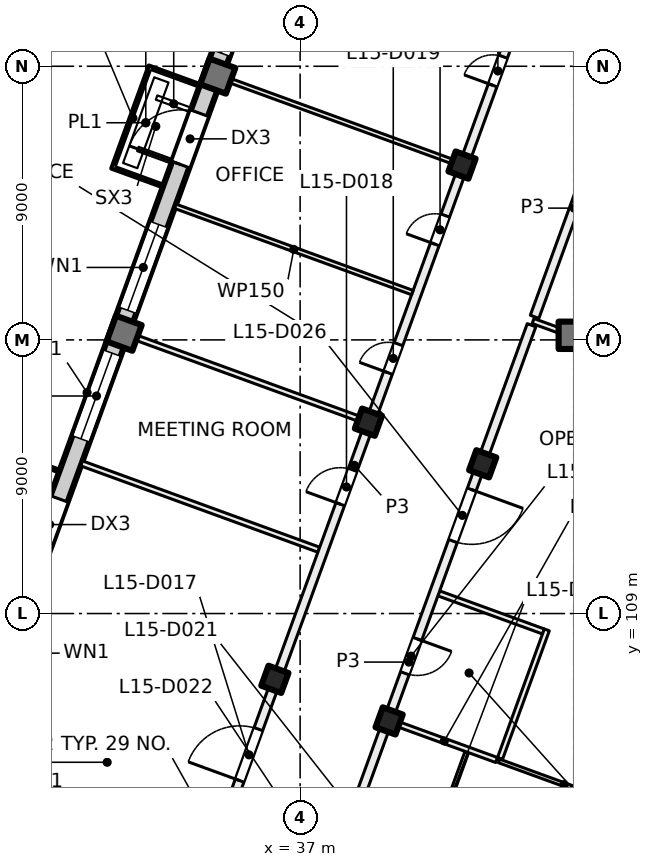
"""IFC4 building model, lengths in metres.
Left out: names, types, materials, properties, quantities, classifications, styles, units other than length and angle.
Written with IfcOpenShell. Run it as: python <this file> out.ifc"""

import sys

from ifc_helpers import new_model, si_unit, direction, frame, frame_2d, origin, origin_2d, place, context, subcontext, project, spatial, rectangle, extrude, element, fill, save


model = new_model("IFC4")
c1 = context("Model", 3, precision=1e-05, world=origin(), true_north=direction((0.0, 1.0)))
c2 = subcontext(c1, "Body", "Model", "MODEL_VIEW")
j1 = project(units=[si_unit("LENGTHUNIT", "METRE"), si_unit("PLANEANGLEUNIT", "RADIAN")], contexts=[c1])
p1 = place(None, origin())
s1 = spatial("IfcSite", under=j1, at=p1, CompositionType="ELEMENT")
p2 = place(p1, origin())
s2 = spatial("IfcBuilding", under=s1, at=p2, CompositionType="ELEMENT")
p3 = place(p2, frame((0.0, 0.0, 67.5)))
s3 = spatial("IfcBuildingStorey", under=s2, at=p3, CompositionType="ELEMENT", Elevation=67.5)
p4 = place(p3, frame((45.952, 118.152, 0.0), z_axis=(0.0, 0.0, 1.0), x_axis=(1.0, 0.0, 0.0)))
e1 = element("IfcColumn", 1, at=p4, inside=s3, PredefinedType="COLUMN", context=c2, shape_type="SweptSolid", body=[
    extrude(rectangle(XDim=0.9, YDim=0.9, at=origin_2d()), origin(), (0.0, 0.0, 1.0), 4.0),
])
for number, where, z_axis, x_axis in (
    (2, (43.006, 113.925, 0.0), (0.0, 0.0, 1.0), (-0.342, -0.94, 0.0)),
    (3, (39.927, 105.468, 0.0), (0.0, 0.0, 1.0), (-0.342, -0.94, 0.0)),
    (4, (42.325, 123.751, 0.0), (0.0, 0.0, 1.0), (-0.342, -0.94, 0.0)),
    (5, (39.247, 115.293, 0.0), (0.0, 0.0, 1.0), (-0.342, -0.94, 0.0)),
    (6, (36.169, 106.836, 0.0), (0.0, 0.0, 1.0), (-0.342, -0.94, 0.0)),
):
    element("IfcColumn", number, at=place(p3, frame(where, z_axis=z_axis, x_axis=x_axis)), inside=s3, PredefinedType="COLUMN", context=c2, shape_type="SweptSolid", body=[
        extrude(rectangle(XDim=0.7, YDim=0.7, at=origin_2d()), origin(), (0.0, 0.0, 1.0), 4.0),
    ])
for number, where, z_axis, x_axis in (
    (7, (34.291, 126.675, 0.0), (0.0, 0.0, 1.0), (-0.342, -0.94, 0.0)),
    (8, (31.212, 118.218, 0.0), (0.0, 0.0, 1.0), (-0.342, -0.94, 0.0)),
):
    element("IfcColumn", number, at=place(p3, frame(where, z_axis=z_axis, x_axis=x_axis)), inside=s3, PredefinedType="COLUMN", context=c2, shape_type="SweptSolid", body=[
        extrude(rectangle(XDim=0.9, YDim=0.9, at=origin_2d()), origin(), (0.0, 0.0, 1.0), 4.0),
    ])
p5 = place(p3, frame((52.212, 113.783, 0.0), z_axis=(0.0, 0.0, 1.0), x_axis=(-0.34202521188, -0.939690775968, 0.0)))
e9 = element("IfcWall", 9, at=p5, inside=s3, PredefinedType="SOLIDWALL", context=c2, shape_type="SweptSolid", body=[
    extrude(rectangle(XDim=21.745, YDim=0.6, at=frame_2d((10.873, 0.0))), origin(), (0.0, 0.0, 1.0), 3.625),
])
p6 = place(p5, frame((3.765, 0.0, 0.9)))
e10 = element("IfcOpeningElement", 10, at=p6, cuts=e9, PredefinedType="OPENING", context=c2, shape_type="SweptSolid", body=[
    extrude(rectangle(XDim=3.0, YDim=2.4, at=frame_2d((1.5, 1.2))), frame((0.0, 0.31, 0.0), z_axis=(0.0, -1.0, 0.0), x_axis=(1.0, 0.0, 0.0)), (0.0, 0.0, 1.0), 0.62),
])
p7 = place(p5, frame((8.865, 0.0, 0.0)))
e11 = element("IfcOpeningElement", 11, at=p7, cuts=e9, PredefinedType="OPENING", context=c2, shape_type="SweptSolid", body=[
    extrude(rectangle(XDim=1.8, YDim=2.4, at=frame_2d((0.9, 1.2))), frame((0.0, 0.31, 0.0), z_axis=(0.0, -1.0, 0.0), x_axis=(1.0, 0.0, 0.0)), (0.0, 0.0, 1.0), 0.62),
])
p8 = place(p5, frame((12.765, 0.0, 0.9)))
e12 = element("IfcOpeningElement", 12, at=p8, cuts=e9, PredefinedType="OPENING", context=c2, shape_type="SweptSolid", body=[
    extrude(rectangle(XDim=3.0, YDim=2.4, at=frame_2d((1.5, 1.2))), frame((0.0, 0.31, 0.0), z_axis=(0.0, -1.0, 0.0), x_axis=(1.0, 0.0, 0.0)), (0.0, 0.0, 1.0), 0.62),
])
p9 = place(p5, frame((17.265, 0.0, 0.9)))
e13 = element("IfcOpeningElement", 13, at=p9, cuts=e9, PredefinedType="OPENING", context=c2, shape_type="SweptSolid", body=[
    extrude(rectangle(XDim=3.0, YDim=2.4, at=frame_2d((1.5, 1.2))), frame((0.0, 0.31, 0.0), z_axis=(0.0, -1.0, 0.0), x_axis=(1.0, 0.0, 0.0)), (0.0, 0.0, 1.0), 0.62),
])
p10 = place(p3, frame((24.666, 100.669, 0.0), z_axis=(0.0, 0.0, 1.0), x_axis=(0.34201964167, 0.939692803373, 0.0)))
e14 = element("IfcWall", 14, at=p10, inside=s3, PredefinedType="SOLIDWALL", context=c2, shape_type="SweptSolid", body=[
    extrude(rectangle(XDim=32.884, YDim=0.6, at=frame_2d((16.442, 0.0))), origin(), (0.0, 0.0, 1.0), 3.625),
])
p11 = place(p10, frame((1.48, 0.0, 0.9)))
e15 = element("IfcOpeningElement", 15, at=p11, cuts=e14, PredefinedType="OPENING", context=c2, shape_type="SweptSolid", body=[
    extrude(rectangle(XDim=3.0, YDim=2.4, at=frame_2d((1.5, 1.2))), frame((0.0, 0.31, 0.0), z_axis=(0.0, -1.0, 0.0), x_axis=(1.0, 0.0, 0.0)), (0.0, 0.0, 1.0), 0.62),
])
p12 = place(p10, frame((5.98, 0.0, 0.9)))
e16 = element("IfcOpeningElement", 16, at=p12, cuts=e14, PredefinedType="OPENING", context=c2, shape_type="SweptSolid", body=[
    extrude(rectangle(XDim=3.0, YDim=2.4, at=frame_2d((1.5, 1.2))), frame((0.0, 0.31, 0.0), z_axis=(0.0, -1.0, 0.0), x_axis=(1.0, 0.0, 0.0)), (0.0, 0.0, 1.0), 0.62),
])
p13 = place(p10, frame((11.08, 0.0, 0.0)))
e17 = element("IfcOpeningElement", 17, at=p13, cuts=e14, PredefinedType="OPENING", context=c2, shape_type="SweptSolid", body=[
    extrude(rectangle(XDim=1.8, YDim=2.4, at=frame_2d((0.9, 1.2))), frame((0.0, 0.31, 0.0), z_axis=(0.0, -1.0, 0.0), x_axis=(1.0, 0.0, 0.0)), (0.0, 0.0, 1.0), 0.62),
])
p14 = place(p10, frame((14.98, 0.0, 0.9)))
e18 = element("IfcOpeningElement", 18, at=p14, cuts=e14, PredefinedType="OPENING", context=c2, shape_type="SweptSolid", body=[
    extrude(rectangle(XDim=3.0, YDim=2.4, at=frame_2d((1.5, 1.2))), frame((0.0, 0.31, 0.0), z_axis=(0.0, -1.0, 0.0), x_axis=(1.0, 0.0, 0.0)), (0.0, 0.0, 1.0), 0.62),
])
p15 = place(p10, frame((19.48, 0.0, 0.9)))
e19 = element("IfcOpeningElement", 19, at=p15, cuts=e14, PredefinedType="OPENING", context=c2, shape_type="SweptSolid", body=[
    extrude(rectangle(XDim=3.0, YDim=2.4, at=frame_2d((1.5, 1.2))), frame((0.0, 0.31, 0.0), z_axis=(0.0, -1.0, 0.0), x_axis=(1.0, 0.0, 0.0)), (0.0, 0.0, 1.0), 0.62),
])
p16 = place(p10, frame((24.58, 0.0, 0.0)))
e20 = element("IfcOpeningElement", 20, at=p16, cuts=e14, PredefinedType="OPENING", context=c2, shape_type="SweptSolid", body=[
    extrude(rectangle(XDim=1.8, YDim=2.4, at=frame_2d((0.9, 1.2))), frame((0.0, 0.31, 0.0), z_axis=(0.0, -1.0, 0.0), x_axis=(1.0, 0.0, 0.0)), (0.0, 0.0, 1.0), 0.62),
])
p17 = place(p10, frame((28.48, 0.0, 0.9)))
e21 = element("IfcOpeningElement", 21, at=p17, cuts=e14, PredefinedType="OPENING", context=c2, shape_type="SweptSolid", body=[
    extrude(rectangle(XDim=3.0, YDim=2.4, at=frame_2d((1.5, 1.2))), frame((0.0, 0.31, 0.0), z_axis=(0.0, -1.0, 0.0), x_axis=(1.0, 0.0, 0.0)), (0.0, 0.0, 1.0), 0.62),
])
p18 = place(p3, frame((29.814, 113.938, 0.0), z_axis=(0.0, 0.0, 1.0), x_axis=(0.939697205528, -0.342007546586, 0.0)))
e22 = element("IfcWall", 22, at=p18, inside=s3, PredefinedType="PARTITIONING", context=c2, shape_type="SweptSolid", body=[
    extrude(rectangle(XDim=8.301, YDim=0.175, at=frame_2d((4.15, 0.0))), origin(), (0.0, 0.0, 1.0), 3.625),
])
p19 = place(p3, frame((31.353, 118.166, 0.0), z_axis=(0.0, 0.0, 1.0), x_axis=(0.939687752599, -0.342033518263, 0.0)))
e23 = element("IfcWall", 23, at=p19, inside=s3, PredefinedType="PARTITIONING", context=c2, shape_type="SweptSolid", body=[
    extrude(rectangle(XDim=8.301, YDim=0.175, at=frame_2d((4.15, 0.0))), origin(), (0.0, 0.0, 1.0), 3.625),
])
p20 = place(p3, frame((32.881, 97.657, 0.0), z_axis=(0.0, 0.0, 1.0), x_axis=(0.342017360004, 0.939693633828, 0.0)))
e24 = element("IfcWall", 24, at=p20, inside=s3, PredefinedType="PARTITIONING", context=c2, shape_type="SweptSolid", body=[
    extrude(rectangle(XDim=34.516, YDim=0.3, at=frame_2d((17.258, 0.0))), origin(), (0.0, 0.0, 1.0), 3.625),
])
p21 = place(p20, frame((6.225, 0.0, 0.0)))
e25 = element("IfcOpeningElement", 25, at=p21, cuts=e24, PredefinedType="OPENING", context=c2, shape_type="SweptSolid", body=[
    extrude(rectangle(XDim=1.8, YDim=2.1, at=frame_2d((0.9, 1.05))), frame((0.0, 0.16, 0.0), z_axis=(0.0, -1.0, 0.0), x_axis=(1.0, 0.0, 0.0)), (0.0, 0.0, 1.0), 0.32),
])
p22 = place(p20, frame((15.9, 0.0, 0.0)))
e26 = element("IfcOpeningElement", 26, at=p22, cuts=e24, PredefinedType="OPENING", context=c2, shape_type="SweptSolid", body=[
    extrude(rectangle(XDim=1.2, YDim=2.1, at=frame_2d((0.6, 1.05))), frame((0.0, 0.16, 0.0), z_axis=(0.0, -1.0, 0.0), x_axis=(1.0, 0.0, 0.0)), (0.0, 0.0, 1.0), 0.32),
])
p23 = place(p20, frame((20.5, 0.0, 0.0)))
e27 = element("IfcOpeningElement", 27, at=p23, cuts=e24, PredefinedType="OPENING", context=c2, shape_type="SweptSolid", body=[
    extrude(rectangle(XDim=1.0, YDim=2.1, at=frame_2d((0.5, 1.05))), frame((0.0, 0.16, 0.0), z_axis=(0.0, -1.0, 0.0), x_axis=(1.0, 0.0, 0.0)), (0.0, 0.0, 1.0), 0.32),
])
p24 = place(p20, frame((25.0, 0.0, 0.0)))
e28 = element("IfcOpeningElement", 28, at=p24, cuts=e24, PredefinedType="OPENING", context=c2, shape_type="SweptSolid", body=[
    extrude(rectangle(XDim=1.0, YDim=2.1, at=frame_2d((0.5, 1.05))), frame((0.0, 0.16, 0.0), z_axis=(0.0, -1.0, 0.0), x_axis=(1.0, 0.0, 0.0)), (0.0, 0.0, 1.0), 0.32),
])
p25 = place(p20, frame((30.562, 0.0, 0.0)))
e29 = element("IfcOpeningElement", 29, at=p25, cuts=e24, PredefinedType="OPENING", context=c2, shape_type="SweptSolid", body=[
    extrude(rectangle(XDim=1.0, YDim=2.1, at=frame_2d((0.5, 1.05))), frame((0.0, 0.16, 0.0), z_axis=(0.0, -1.0, 0.0), x_axis=(1.0, 0.0, 0.0)), (0.0, 0.0, 1.0), 0.32),
])
p26 = place(p3, frame((32.892, 122.395, 0.0), z_axis=(0.0, 0.0, 1.0), x_axis=(0.939684311623, -0.3420429717, 0.0)))
e30 = element("IfcWall", 30, at=p26, inside=s3, PredefinedType="PARTITIONING", context=c2, shape_type="SweptSolid", body=[
    extrude(rectangle(XDim=8.301, YDim=0.15, at=frame_2d((4.15, 0.0))), origin(), (0.0, 0.0, 1.0), 3.625),
])
p27 = place(p3, frame((42.482, 104.446, 0.0), z_axis=(0.0, 0.0, 1.0), x_axis=(-0.342025030348, -0.939690842041, 0.0)))
e31 = element("IfcWall", 31, at=p27, inside=s3, PredefinedType="PARTITIONING", context=c2, shape_type="SweptSolid", body=[
    extrude(rectangle(XDim=9.663, YDim=0.125, at=frame_2d((4.832, 0.0))), origin(), (0.0, 0.0, 1.0), 3.625),
])
p28 = place(p27, frame((1.797, 0.0, 0.0)))
e32 = element("IfcOpeningElement", 32, at=p28, cuts=e31, PredefinedType="OPENING", context=c2, shape_type="SweptSolid", body=[
    extrude(rectangle(XDim=0.8, YDim=2.1, at=frame_2d((0.4, 1.05))), frame((0.0, 0.073, 0.0), z_axis=(0.0, -1.0, 0.0), x_axis=(1.0, 0.0, 0.0)), (0.0, 0.0, 1.0), 0.145),
])
p29 = place(p27, frame((5.015, 0.0, 0.0)))
e33 = element("IfcOpeningElement", 33, at=p29, cuts=e31, PredefinedType="OPENING", context=c2, shape_type="SweptSolid", body=[
    extrude(rectangle(XDim=0.8, YDim=2.1, at=frame_2d((0.4, 1.05))), frame((0.0, 0.073, 0.0), z_axis=(0.0, -1.0, 0.0), x_axis=(1.0, 0.0, 0.0)), (0.0, 0.0, 1.0), 0.145),
])
p30 = place(p3, frame((40.021, 105.434, 0.0), z_axis=(0.0, 0.0, 1.0), x_axis=(0.939740864669, -0.341887565249, 0.0)))
e34 = element("IfcWall", 34, at=p30, inside=s3, PredefinedType="PARTITIONING", context=c2, shape_type="SweptSolid", body=[
    extrude(rectangle(XDim=3.663, YDim=0.175, at=frame_2d((1.831, 0.0))), origin(), (0.0, 0.0, 1.0), 3.625),
])
p31 = place(p3, frame((41.561, 109.663, 0.0), z_axis=(0.0, 0.0, 1.0), x_axis=(0.939623960717, -0.342208726434, 0.0)))
e35 = element("IfcWall", 35, at=p31, inside=s3, PredefinedType="PARTITIONING", context=c2, shape_type="SweptSolid", body=[
    extrude(rectangle(XDim=3.662, YDim=0.175, at=frame_2d((1.831, 0.0))), origin(), (0.0, 0.0, 1.0), 3.625),
])
p32 = place(p3, frame((42.231, 123.785, 0.0), z_axis=(0.0, 0.0, 1.0), x_axis=(-0.939687752599, 0.342033518263, 0.0)))
e36 = element("IfcWall", 36, at=p32, inside=s3, PredefinedType="PARTITIONING", context=c2, shape_type="SweptSolid", body=[
    extrude(rectangle(XDim=8.301, YDim=0.15, at=frame_2d((4.15, 0.0))), origin(), (0.0, 0.0, 1.0), 3.625),
])
p33 = place(p3, frame((43.542, 104.153, 0.0), z_axis=(0.0, 0.0, 1.0), x_axis=(0.939646198652, -0.34214766017, 0.0)))
e37 = element("IfcWall", 37, at=p33, inside=s3, PredefinedType="PARTITIONING", context=c2, shape_type="SweptSolid", body=[
    extrude(rectangle(XDim=4.554, YDim=0.125, at=frame_2d((2.277, 0.0))), origin(), (0.0, 0.0, 1.0), 3.625),
])
p34 = place(p3, frame((52.965, 115.598, 0.0), z_axis=(0.0, 0.0, 1.0), x_axis=(-0.939650555598, 0.342135694374, 0.0)))
e38 = element("IfcWall", 38, at=p34, inside=s3, PredefinedType="PARTITIONING", context=c2, shape_type="SweptSolid", body=[
    extrude(rectangle(XDim=8.836, YDim=0.175, at=frame_2d((4.418, 0.0))), origin(), (0.0, 0.0, 1.0), 3.625),
])
p35 = place(p34, frame((3.818, 0.0, 0.0)))
e39 = element("IfcOpeningElement", 39, at=p35, cuts=e38, PredefinedType="OPENING", context=c2, shape_type="SweptSolid", body=[
    extrude(rectangle(XDim=1.2, YDim=2.1, at=frame_2d((0.6, 1.05))), frame((0.0, 0.097, 0.0), z_axis=(0.0, -1.0, 0.0), x_axis=(1.0, 0.0, 0.0)), (0.0, 0.0, 1.0), 0.195),
])
p36 = place(p3, frame((44.612, 118.483, 0.0), z_axis=(0.0, 0.0, 1.0), x_axis=(-0.342043123066, -0.939684256526, 0.0)))
e40 = element("IfcWall", 40, at=p36, inside=s3, PredefinedType="PARTITIONING", context=c2, shape_type="SweptSolid", body=[
    extrude(rectangle(XDim=23.582, YDim=0.3, at=frame_2d((11.791, 0.0))), origin(), (0.0, 0.0, 1.0), 3.625),
])
p37 = place(p36, frame((16.583, 0.0, 0.0)))
e41 = element("IfcOpeningElement", 41, at=p37, cuts=e40, PredefinedType="OPENING", context=c2, shape_type="SweptSolid", body=[
    extrude(rectangle(XDim=1.0, YDim=2.1, at=frame_2d((0.5, 1.05))), frame((0.0, 0.16, 0.0), z_axis=(0.0, -1.0, 0.0), x_axis=(1.0, 0.0, 0.0)), (0.0, 0.0, 1.0), 0.32),
])
p38 = place(p36, frame((10.982, 0.0, 0.0)))
e42 = element("IfcOpeningElement", 42, at=p38, cuts=e40, PredefinedType="OPENING", context=c2, shape_type="SweptSolid", body=[
    extrude(rectangle(XDim=1.2, YDim=2.1, at=frame_2d((0.6, 1.05))), frame((0.0, 0.16, 0.0), z_axis=(0.0, -1.0, 0.0), x_axis=(1.0, 0.0, 0.0)), (0.0, 0.0, 1.0), 0.32),
])
p39 = place(p36, frame((5.756, 0.0, 0.0)))
e43 = element("IfcOpeningElement", 43, at=p39, cuts=e40, PredefinedType="OPENING", context=c2, shape_type="SweptSolid", body=[
    extrude(rectangle(XDim=1.8, YDim=2.1, at=frame_2d((0.9, 1.05))), frame((0.0, 0.16, 0.0), z_axis=(0.0, -1.0, 0.0), x_axis=(1.0, 0.0, 0.0)), (0.0, 0.0, 1.0), 0.32),
])
p40 = place(p3, frame((45.114, 108.462, 0.0), z_axis=(0.0, 0.0, 1.0), x_axis=(-0.342056723843, -0.93967930576, 0.0)))
e44 = element("IfcWall", 44, at=p40, inside=s3, PredefinedType="PARTITIONING", context=c2, shape_type="SweptSolid", body=[
    extrude(rectangle(XDim=4.5, YDim=0.175, at=frame_2d((2.25, 0.0))), origin(), (0.0, 0.0, 1.0), 3.625),
])
p41 = place(p3, frame((47.314, 125.909, 0.0), z_axis=(0.0, 0.0, 1.0), x_axis=(-0.34198522802, -0.939705328183, 0.0)))
e45 = element("IfcWall", 45, at=p41, inside=s3, PredefinedType="PARTITIONING", context=c2, shape_type="SweptSolid", body=[
    extrude(rectangle(XDim=7.609, YDim=0.3, at=frame_2d((3.804, 0.0))), origin(), (0.0, 0.0, 1.0), 3.625),
])
p42 = place(p13, origin())
e46 = element("IfcDoor", 46, at=p42, inside=s3, OperationType="DOUBLE_DOOR_SINGLE_SWING", PredefinedType="DOOR", context=c2, shape_type="SweptSolid", body=[
    extrude(rectangle(XDim=1.8, YDim=2.4, at=frame_2d((0.9, 1.2))), frame((0.0, 0.025, 0.0), z_axis=(0.0, -1.0, 0.0), x_axis=(1.0, 0.0, 0.0)), (0.0, 0.0, 1.0), 0.05),
])
fill(e17, e46)
p43 = place(p14, origin())
e47 = element("IfcWindow", 47, at=p43, inside=s3, PartitioningType="SINGLE_PANEL", PredefinedType="WINDOW", context=c2, shape_type="SweptSolid", body=[
    extrude(rectangle(XDim=3.0, YDim=2.4, at=frame_2d((1.5, 1.2))), frame((0.0, 0.03, 0.0), z_axis=(0.0, -1.0, 0.0), x_axis=(1.0, 0.0, 0.0)), (0.0, 0.0, 1.0), 0.06),
])
fill(e18, e47)
p44 = place(p15, origin())
e48 = element("IfcWindow", 48, at=p44, inside=s3, PartitioningType="SINGLE_PANEL", PredefinedType="WINDOW", context=c2, shape_type="SweptSolid", body=[
    extrude(rectangle(XDim=3.0, YDim=2.4, at=frame_2d((1.5, 1.2))), frame((0.0, 0.03, 0.0), z_axis=(0.0, -1.0, 0.0), x_axis=(1.0, 0.0, 0.0)), (0.0, 0.0, 1.0), 0.06),
])
fill(e19, e48)
p45 = place(p16, origin())
e49 = element("IfcDoor", 49, at=p45, inside=s3, OperationType="DOUBLE_DOOR_SINGLE_SWING", PredefinedType="DOOR", context=c2, shape_type="SweptSolid", body=[
    extrude(rectangle(XDim=1.8, YDim=2.4, at=frame_2d((0.9, 1.2))), frame((0.0, 0.025, 0.0), z_axis=(0.0, -1.0, 0.0), x_axis=(1.0, 0.0, 0.0)), (0.0, 0.0, 1.0), 0.05),
])
fill(e20, e49)
p46 = place(p17, origin())
e50 = element("IfcWindow", 50, at=p46, inside=s3, PartitioningType="SINGLE_PANEL", PredefinedType="WINDOW", context=c2, shape_type="SweptSolid", body=[
    extrude(rectangle(XDim=3.0, YDim=2.4, at=frame_2d((1.5, 1.2))), frame((0.0, 0.03, 0.0), z_axis=(0.0, -1.0, 0.0), x_axis=(1.0, 0.0, 0.0)), (0.0, 0.0, 1.0), 0.06),
])
fill(e21, e50)
p47 = place(p21, origin())
e51 = element("IfcDoor", 51, at=p47, inside=s3, OperationType="DOUBLE_DOOR_SINGLE_SWING", PredefinedType="DOOR", context=c2, shape_type="SweptSolid", body=[
    extrude(rectangle(XDim=1.8, YDim=2.1, at=frame_2d((0.9, 1.05))), frame((0.0, 0.025, 0.0), z_axis=(0.0, -1.0, 0.0), x_axis=(1.0, 0.0, 0.0)), (0.0, 0.0, 1.0), 0.05),
])
fill(e25, e51)
p48 = place(p22, origin())
e52 = element("IfcDoor", 52, at=p48, inside=s3, OperationType="DOUBLE_DOOR_SINGLE_SWING", PredefinedType="DOOR", context=c2, shape_type="SweptSolid", body=[
    extrude(rectangle(XDim=1.2, YDim=2.1, at=frame_2d((0.6, 1.05))), frame((0.0, 0.025, 0.0), z_axis=(0.0, -1.0, 0.0), x_axis=(1.0, 0.0, 0.0)), (0.0, 0.0, 1.0), 0.05),
])
fill(e26, e52)
p49 = place(p23, origin())
e53 = element("IfcDoor", 53, at=p49, inside=s3, OperationType="SINGLE_SWING_LEFT", PredefinedType="DOOR", context=c2, shape_type="SweptSolid", body=[
    extrude(rectangle(XDim=1.0, YDim=2.1, at=frame_2d((0.5, 1.05))), frame((0.0, 0.025, 0.0), z_axis=(0.0, -1.0, 0.0), x_axis=(1.0, 0.0, 0.0)), (0.0, 0.0, 1.0), 0.05),
])
fill(e27, e53)
p50 = place(p24, origin())
e54 = element("IfcDoor", 54, at=p50, inside=s3, OperationType="SINGLE_SWING_RIGHT", PredefinedType="DOOR", context=c2, shape_type="SweptSolid", body=[
    extrude(rectangle(XDim=1.0, YDim=2.1, at=frame_2d((0.5, 1.05))), frame((0.0, 0.025, 0.0), z_axis=(0.0, -1.0, 0.0), x_axis=(1.0, 0.0, 0.0)), (0.0, 0.0, 1.0), 0.05),
])
fill(e28, e54)
p51 = place(p38, origin())
e55 = element("IfcDoor", 55, at=p51, inside=s3, OperationType="DOUBLE_DOOR_SINGLE_SWING", PredefinedType="DOOR", context=c2, shape_type="SweptSolid", body=[
    extrude(rectangle(XDim=1.2, YDim=2.1, at=frame_2d((0.6, 1.05))), frame((0.0, 0.025, 0.0), z_axis=(0.0, -1.0, 0.0), x_axis=(1.0, 0.0, 0.0)), (0.0, 0.0, 1.0), 0.05),
])
fill(e42, e55)
p52 = place(p39, origin())
e56 = element("IfcDoor", 56, at=p52, inside=s3, OperationType="DOUBLE_DOOR_SINGLE_SWING", PredefinedType="DOOR", context=c2, shape_type="SweptSolid", body=[
    extrude(rectangle(XDim=1.8, YDim=2.1, at=frame_2d((0.9, 1.05))), frame((0.0, 0.025, 0.0), z_axis=(0.0, -1.0, 0.0), x_axis=(1.0, 0.0, 0.0)), (0.0, 0.0, 1.0), 0.05),
])
fill(e43, e56)
p53 = place(p25, origin())
e57 = element("IfcDoor", 57, at=p53, inside=s3, OperationType="SINGLE_SWING_LEFT", PredefinedType="DOOR", context=c2, shape_type="SweptSolid", body=[
    extrude(rectangle(XDim=1.0, YDim=2.1, at=frame_2d((0.5, 1.05))), frame((0.0, 0.025, 0.0), z_axis=(0.0, -1.0, 0.0), x_axis=(1.0, 0.0, 0.0)), (0.0, 0.0, 1.0), 0.05),
])
fill(e29, e57)
save(model, sys.argv[1])
